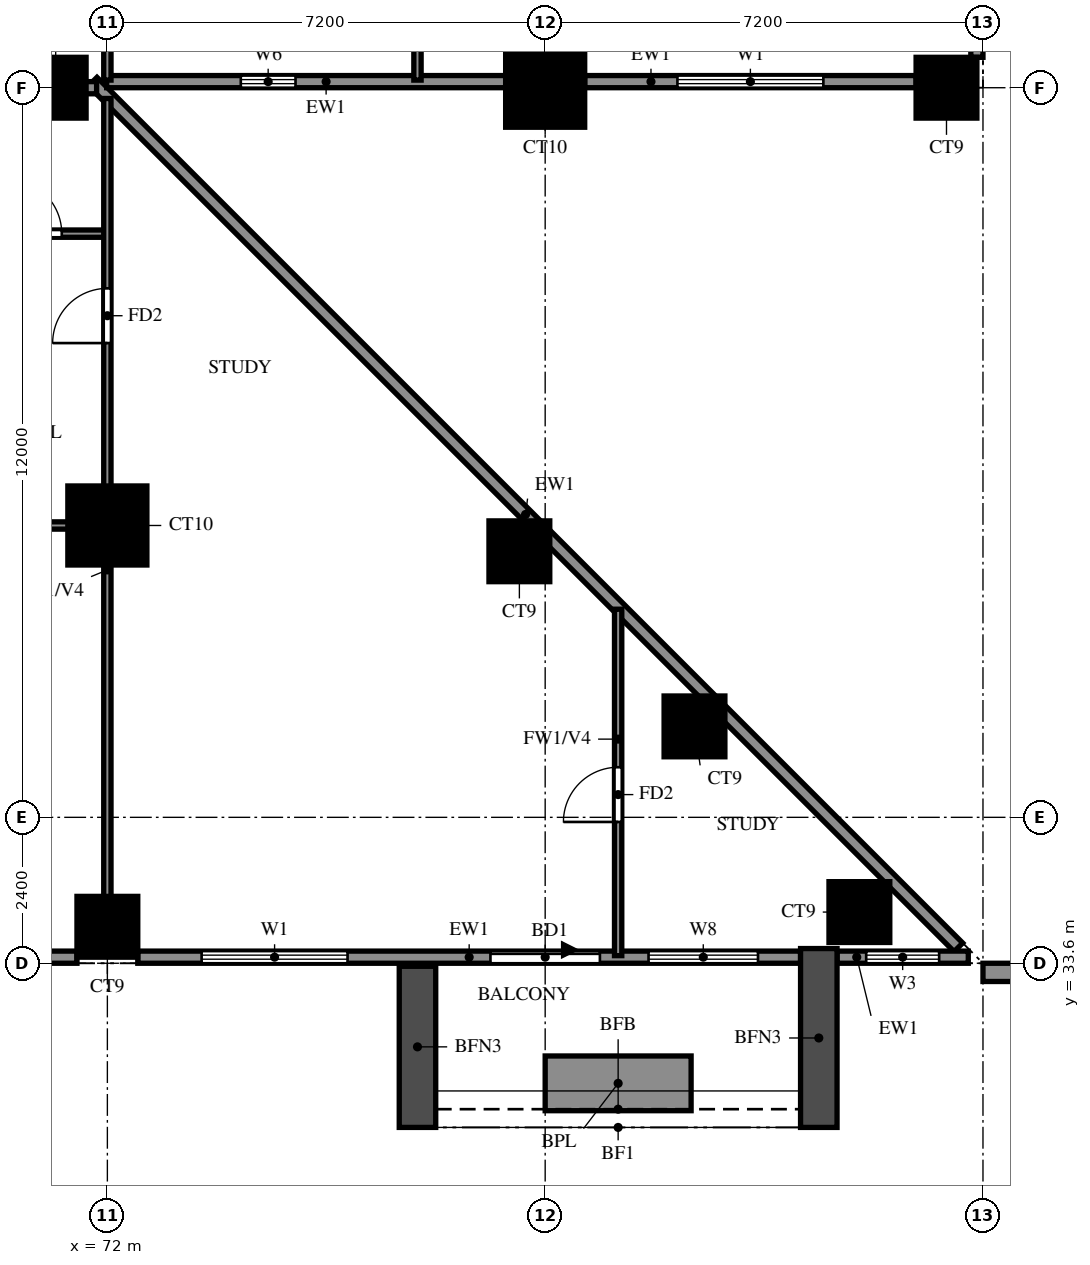
"""IFC4 building model, lengths in metres.
Left out: names, types, materials, properties, quantities, classifications, styles, units other than length and angle.
Written with IfcOpenShell. Run it as: python <this file> out.ifc"""

import sys

from ifc_helpers import new_model, si_unit, direction, frame, frame_2d, origin, origin_2d, place, context, subcontext, project, spatial, rectangle, extrude, source, transform, mapped, element, fill, save


model = new_model("IFC4")
c1 = context("Model", 3, precision=1e-05, world=origin(), true_north=direction((0.0, 1.0)))
c2 = subcontext(c1, "Body", "Model", "MODEL_VIEW")
j1 = project(units=[si_unit("LENGTHUNIT", "METRE"), si_unit("PLANEANGLEUNIT", "RADIAN")], contexts=[c1])
p1 = place(None, origin())
s1 = spatial("IfcSite", under=j1, at=p1, CompositionType="ELEMENT")
p2 = place(p1, origin())
s2 = spatial("IfcBuilding", under=s1, at=p2, CompositionType="ELEMENT")
p3 = place(p2, frame((0.0, 0.0, 76.0)))
s3 = spatial("IfcBuildingStorey", under=s2, at=p3, CompositionType="ELEMENT", Elevation=76.0)
m1 = source(origin(), c2, "Body", "SweptSolid", [
    extrude(rectangle(XDim=1.0, YDim=1.0, at=origin_2d()), origin(), (0.0, 0.0, 1.0), 3.18),
])
for number, where, z_axis, x_axis in (
    (1, (72.0, 34.2, 0.0), (0.0, 0.0, 1.0), (1.0, 0.0, 0.0)),
    (2, (84.367, 34.442, 0.0), (0.0, 0.0, 1.0), (1.0, 0.0, 0.0)),
    (3, (81.656, 37.496, 0.0), (0.0, 0.0, 1.0), (1.0, 0.0, 0.0)),
    (4, (78.776, 40.376, 0.0), (0.0, 0.0, 1.0), (1.0, 0.0, 0.0)),
):
    element("IfcColumn", number, at=place(p3, frame(where, z_axis=z_axis, x_axis=x_axis)), inside=s3, PredefinedType="COLUMN", context=c2, shape_type="MappedRepresentation", body=[
        mapped(m1, transform((0.0, 0.0, 0.0))),
    ])
m2 = source(origin(), c2, "Body", "SweptSolid", [
    extrude(rectangle(XDim=1.3, YDim=1.3, at=origin_2d()), origin(), (0.0, 0.0, 1.0), 3.18),
])
p4 = place(p3, frame((72.0, 40.8, 0.0), z_axis=(0.0, 0.0, 1.0), x_axis=(1.0, 0.0, 0.0)))
e5 = element("IfcColumn", 5, at=p4, inside=s3, PredefinedType="COLUMN", context=c2, shape_type="MappedRepresentation", body=[
    mapped(m2, transform((0.0, 0.0, 0.0))),
])
p5 = place(p3, frame((71.15, 48.0, 0.0), z_axis=(0.0, 0.0, 1.0), x_axis=(1.0, 0.0, 0.0)))
e6 = element("IfcColumn", 6, at=p5, inside=s3, PredefinedType="COLUMN", context=c2, shape_type="MappedRepresentation", body=[
    mapped(m1, transform((0.0, 0.0, 0.0))),
])
p6 = place(p3, frame((79.2, 48.0, 0.0), z_axis=(0.0, 0.0, 1.0), x_axis=(1.0, 0.0, 0.0)))
e7 = element("IfcColumn", 7, at=p6, inside=s3, PredefinedType="COLUMN", context=c2, shape_type="MappedRepresentation", body=[
    mapped(m2, transform((0.0, 0.0, 0.0))),
])
p7 = place(p3, frame((85.8, 48.0, 0.0), z_axis=(0.0, 0.0, 1.0), x_axis=(1.0, 0.0, 0.0)))
e8 = element("IfcColumn", 8, at=p7, inside=s3, PredefinedType="COLUMN", context=c2, shape_type="MappedRepresentation", body=[
    mapped(m1, transform((0.0, 0.0, 0.0))),
])
p8 = place(p3, frame((85.996, 33.863, 0.0), z_axis=(0.0, 0.0, 1.0), x_axis=(-0.707100718496, 0.707112843825, 0.0)))
e9 = element("IfcWall", 9, at=p8, inside=s3, PredefinedType="SOLIDWALL", context=c2, shape_type="SweptSolid", body=[
    extrude(rectangle(XDim=20.135, YDim=0.2, at=frame_2d((10.067, 0.0))), origin(), (0.0, 0.0, 1.0), 3.18),
])
p9 = place(p3, frame((71.989, 48.1, 0.0), z_axis=(0.0, 0.0, 1.0), x_axis=(1.0, 0.0, 0.0)))
e10 = element("IfcWall", 10, at=p9, inside=s3, PredefinedType="SOLIDWALL", context=c2, shape_type="SweptSolid", body=[
    extrude(rectangle(XDim=6.562, YDim=0.2, at=frame_2d((3.281, 0.0))), origin(), (0.0, 0.0, 1.0), 3.18),
])
p10 = place(p9, frame((2.206, 0.0, 1.5)))
e11 = element("IfcOpeningElement", 11, at=p10, cuts=e10, PredefinedType="OPENING", context=c2, shape_type="SweptSolid", body=[
    extrude(rectangle(XDim=0.9, YDim=0.9, at=frame_2d((0.45, 0.45))), frame((0.0, 0.11, 0.0), z_axis=(0.0, -1.0, 0.0), x_axis=(1.0, 0.0, 0.0)), (0.0, 0.0, 1.0), 0.22),
])
p11 = place(p3, frame((79.85, 48.1, 0.0), z_axis=(0.0, 0.0, 1.0), x_axis=(1.0, 0.0, 0.0)))
e12 = element("IfcWall", 12, at=p11, inside=s3, PredefinedType="SOLIDWALL", context=c2, shape_type="SweptSolid", body=[
    extrude(rectangle(XDim=5.45, YDim=0.2, at=frame_2d((2.725, 0.0))), origin(), (0.0, 0.0, 1.0), 3.18),
])
p12 = place(p11, frame((1.525, 0.0, 0.6)))
e13 = element("IfcOpeningElement", 13, at=p12, cuts=e12, PredefinedType="OPENING", context=c2, shape_type="SweptSolid", body=[
    extrude(rectangle(XDim=2.4, YDim=2.4, at=frame_2d((1.2, 1.2))), frame((0.0, 0.11, 0.0), z_axis=(0.0, -1.0, 0.0), x_axis=(1.0, 0.0, 0.0)), (0.0, 0.0, 1.0), 0.22),
])
p13 = place(p3, frame((86.3, 48.5, 0.0), z_axis=(0.0, 0.0, 1.0), x_axis=(0.0, 1.0, 0.0)))
e14 = element("IfcWall", 14, at=p13, inside=s3, PredefinedType="SOLIDWALL", context=c2, shape_type="SweptSolid", body=[
    extrude(rectangle(XDim=6.2, YDim=0.2, at=frame_2d((3.1, 0.0))), origin(), (0.0, 0.0, 1.0), 3.18),
])
p14 = place(p13, frame((1.9, 0.0, 0.6)))
e15 = element("IfcOpeningElement", 15, at=p14, cuts=e14, PredefinedType="OPENING", context=c2, shape_type="SweptSolid", body=[
    extrude(rectangle(XDim=2.4, YDim=2.4, at=frame_2d((1.2, 1.2))), frame((0.0, 0.11, 0.0), z_axis=(0.0, -1.0, 0.0), x_axis=(1.0, 0.0, 0.0)), (0.0, 0.0, 1.0), 0.22),
])
p15 = place(p3, frame((65.3, 33.7, 0.0), z_axis=(0.0, 0.0, 1.0), x_axis=(1.0, 0.0, 0.0)))
e16 = element("IfcWall", 16, at=p15, inside=s3, PredefinedType="SOLIDWALL", context=c2, shape_type="SweptSolid", body=[
    extrude(rectangle(XDim=6.2, YDim=0.2, at=frame_2d((3.1, 0.0))), origin(), (0.0, 0.0, 1.0), 3.18),
])
p16 = place(p15, frame((3.65, 0.0, 0.6)))
e17 = element("IfcOpeningElement", 17, at=p16, cuts=e16, PredefinedType="OPENING", context=c2, shape_type="SweptSolid", body=[
    extrude(rectangle(XDim=1.8, YDim=2.4, at=frame_2d((0.9, 1.2))), frame((0.0, 0.11, 0.0), z_axis=(0.0, -1.0, 0.0), x_axis=(1.0, 0.0, 0.0)), (0.0, 0.0, 1.0), 0.22),
])
p17 = place(p15, frame((1.2, 0.0, 1.5)))
e18 = element("IfcOpeningElement", 18, at=p17, cuts=e16, PredefinedType="OPENING", context=c2, shape_type="SweptSolid", body=[
    extrude(rectangle(XDim=0.9, YDim=0.9, at=frame_2d((0.45, 0.45))), frame((0.0, 0.11, 0.0), z_axis=(0.0, -1.0, 0.0), x_axis=(1.0, 0.0, 0.0)), (0.0, 0.0, 1.0), 0.22),
])
p18 = place(p3, frame((72.5, 33.7, 0.0), z_axis=(0.0, 0.0, 1.0), x_axis=(1.0, 0.0, 0.0)))
e19 = element("IfcWall", 19, at=p18, inside=s3, PredefinedType="SOLIDWALL", context=c2, shape_type="SweptSolid", body=[
    extrude(rectangle(XDim=10.9, YDim=0.2, at=frame_2d((5.45, 0.0))), origin(), (0.0, 0.0, 1.0), 3.18),
])
p19 = place(p18, frame((5.8, 0.0, 0.0)))
e20 = element("IfcOpeningElement", 20, at=p19, cuts=e19, PredefinedType="OPENING", context=c2, shape_type="SweptSolid", body=[
    extrude(rectangle(XDim=1.8, YDim=2.4, at=frame_2d((0.9, 1.2))), frame((0.0, 0.11, 0.0), z_axis=(0.0, -1.0, 0.0), x_axis=(1.0, 0.0, 0.0)), (0.0, 0.0, 1.0), 0.22),
])
p20 = place(p18, frame((1.05, 0.0, 0.6)))
e21 = element("IfcOpeningElement", 21, at=p20, cuts=e19, PredefinedType="OPENING", context=c2, shape_type="SweptSolid", body=[
    extrude(rectangle(XDim=2.4, YDim=2.4, at=frame_2d((1.2, 1.2))), frame((0.0, 0.11, 0.0), z_axis=(0.0, -1.0, 0.0), x_axis=(1.0, 0.0, 0.0)), (0.0, 0.0, 1.0), 0.22),
])
p21 = place(p18, frame((8.4, 0.0, 0.6)))
e22 = element("IfcOpeningElement", 22, at=p21, cuts=e19, PredefinedType="OPENING", context=c2, shape_type="SweptSolid", body=[
    extrude(rectangle(XDim=1.8, YDim=2.4, at=frame_2d((0.9, 1.2))), frame((0.0, 0.11, 0.0), z_axis=(0.0, -1.0, 0.0), x_axis=(1.0, 0.0, 0.0)), (0.0, 0.0, 1.0), 0.22),
])
p22 = place(p3, frame((84.0, 33.7, 0.0), z_axis=(0.0, 0.0, 1.0), x_axis=(1.0, 0.0, 0.0)))
e23 = element("IfcWall", 23, at=p22, inside=s3, PredefinedType="SOLIDWALL", context=c2, shape_type="SweptSolid", body=[
    extrude(rectangle(XDim=2.159, YDim=0.2, at=frame_2d((1.079, 0.0))), origin(), (0.0, 0.0, 1.0), 3.18),
])
p23 = place(p22, frame((0.479, 0.0, 0.6)))
e24 = element("IfcOpeningElement", 24, at=p23, cuts=e23, PredefinedType="OPENING", context=c2, shape_type="SweptSolid", body=[
    extrude(rectangle(XDim=1.2, YDim=2.4, at=frame_2d((0.6, 1.2))), frame((0.0, 0.11, 0.0), z_axis=(0.0, -1.0, 0.0), x_axis=(1.0, 0.0, 0.0)), (0.0, 0.0, 1.0), 0.22),
])
p24 = place(p3, frame((86.4, 33.45, -0.32), z_axis=(0.0, 0.0, 1.0), x_axis=(1.0, 0.0, 0.0)))
e25 = element("IfcWall", 25, at=p24, inside=s3, PredefinedType="SOLIDWALL", context=c2, shape_type="SweptSolid", body=[
    extrude(rectangle(XDim=2.4, YDim=0.3, at=frame_2d((1.2, 0.0))), origin(), (0.0, 0.0, 1.0), 3.5),
])
p25 = place(p3, frame((77.1, 33.55, 0.0), z_axis=(0.0, 0.0, 1.0), x_axis=(0.0, -1.0, 0.0)))
e26 = element("IfcWall", 26, at=p25, inside=s3, PredefinedType="SOLIDWALL", context=c2, shape_type="SweptSolid", body=[
    extrude(rectangle(XDim=2.65, YDim=0.6, at=frame_2d((1.325, 0.0))), origin(), (0.0, 0.0, 1.0), 2.85),
])
p26 = place(p3, frame((83.7, 33.842, 0.0), z_axis=(0.0, 0.0, 1.0), x_axis=(0.0, -1.0, 0.0)))
e27 = element("IfcWall", 27, at=p26, inside=s3, PredefinedType="SOLIDWALL", context=c2, shape_type="SweptSolid", body=[
    extrude(rectangle(XDim=2.942, YDim=0.6, at=frame_2d((1.471, 0.0))), origin(), (0.0, 0.0, 1.0), 2.85),
])
p27 = place(p3, frame((79.2, 31.625, 0.0), z_axis=(0.0, 0.0, 1.0), x_axis=(1.0, 0.0, 0.0)))
e28 = element("IfcWall", 28, at=p27, inside=s3, PredefinedType="SOLIDWALL", context=c2, shape_type="SweptSolid", body=[
    extrude(rectangle(XDim=2.4, YDim=0.9, at=frame_2d((1.2, 0.0))), origin(), (0.0, 0.0, 1.0), 0.9),
])
p28 = place(p3, frame((67.2, 48.0, 0.0), z_axis=(0.0, 0.0, 1.0), x_axis=(1.0, 0.0, 0.0)))
e29 = element("IfcWall", 29, at=p28, inside=s3, PredefinedType="SOLIDWALL", context=c2, shape_type="SweptSolid", body=[
    extrude(rectangle(XDim=4.623, YDim=0.2, at=frame_2d((2.312, 0.0))), origin(), (0.0, 0.0, 1.0), 3.18),
])
p29 = place(p3, frame((68.4, 40.8, 0.0), z_axis=(0.0, 0.0, 1.0), x_axis=(1.0, 0.0, 0.0)))
e30 = element("IfcWall", 30, at=p29, inside=s3, PredefinedType="PARTITIONING", context=c2, shape_type="SweptSolid", body=[
    extrude(rectangle(XDim=3.6, YDim=0.12, at=frame_2d((1.8, 0.0))), origin(), (0.0, 0.0, 1.0), 3.18),
])
p30 = place(p29, frame((1.35, 0.0, 0.0)))
e31 = element("IfcOpeningElement", 31, at=p30, cuts=e30, PredefinedType="OPENING", context=c2, shape_type="SweptSolid", body=[
    extrude(rectangle(XDim=0.9, YDim=2.1, at=frame_2d((0.45, 1.05))), frame((0.0, 0.07, 0.0), z_axis=(0.0, -1.0, 0.0), x_axis=(1.0, 0.0, 0.0)), (0.0, 0.0, 1.0), 0.14),
])
p31 = place(p3, frame((67.2, 45.6, 0.0), z_axis=(0.0, 0.0, 1.0), x_axis=(1.0, 0.0, 0.0)))
e32 = element("IfcWall", 32, at=p31, inside=s3, PredefinedType="PARTITIONING", context=c2, shape_type="SweptSolid", body=[
    extrude(rectangle(XDim=4.8, YDim=0.12, at=frame_2d((2.4, 0.0))), origin(), (0.0, 0.0, 1.0), 3.18),
])
p32 = place(p31, frame((3.15, 0.0, 0.0)))
e33 = element("IfcOpeningElement", 33, at=p32, cuts=e32, PredefinedType="OPENING", context=c2, shape_type="SweptSolid", body=[
    extrude(rectangle(XDim=0.9, YDim=2.1, at=frame_2d((0.45, 1.05))), frame((0.0, 0.07, 0.0), z_axis=(0.0, -1.0, 0.0), x_axis=(1.0, 0.0, 0.0)), (0.0, 0.0, 1.0), 0.14),
])
p33 = place(p3, frame((72.0, 33.725, 0.0), z_axis=(0.0, 0.0, 1.0), x_axis=(0.0, 1.0, 0.0)))
e34 = element("IfcWall", 34, at=p33, inside=s3, PredefinedType="PARTITIONING", context=c2, shape_type="SweptSolid", body=[
    extrude(rectangle(XDim=14.098, YDim=0.12, at=frame_2d((7.049, 0.0))), origin(), (0.0, 0.0, 1.0), 2.28),
])
p34 = place(p33, frame((10.075, 0.0, 0.0)))
e35 = element("IfcOpeningElement", 35, at=p34, cuts=e34, PredefinedType="OPENING", context=c2, shape_type="SweptSolid", body=[
    extrude(rectangle(XDim=0.9, YDim=2.1, at=frame_2d((0.45, 1.05))), frame((0.0, 0.07, 0.0), z_axis=(0.0, -1.0, 0.0), x_axis=(1.0, 0.0, 0.0)), (0.0, 0.0, 1.0), 0.14),
])
for number, where, z_axis, x_axis in (
    (36, (72.0, 48.125, 0.0), (0.0, 0.0, 1.0), (0.0, 1.0, 0.0)),
    (37, (77.1, 48.125, 0.0), (0.0, 0.0, 1.0), (0.0, 1.0, 0.0)),
):
    element("IfcWall", number, at=place(p3, frame(where, z_axis=z_axis, x_axis=x_axis)), inside=s3, PredefinedType="PARTITIONING", context=c2, shape_type="SweptSolid", body=[
        extrude(rectangle(XDim=3.475, YDim=0.12, at=frame_2d((1.738, 0.0))), origin(), (0.0, 0.0, 1.0), 3.18),
    ])
p35 = place(p3, frame((79.2, 48.125, 0.0), z_axis=(0.0, 0.0, 1.0), x_axis=(0.0, 1.0, 0.0)))
e38 = element("IfcWall", 38, at=p35, inside=s3, PredefinedType="PARTITIONING", context=c2, shape_type="SweptSolid", body=[
    extrude(rectangle(XDim=25.075, YDim=0.12, at=frame_2d((12.538, 0.0))), origin(), (0.0, 0.0, 1.0), 3.18),
])
p36 = place(p35, frame((2.788, 0.0, 0.0)))
e39 = element("IfcOpeningElement", 39, at=p36, cuts=e38, PredefinedType="OPENING", context=c2, shape_type="SweptSolid", body=[
    extrude(rectangle(XDim=1.5, YDim=2.1, at=frame_2d((0.75, 1.05))), frame((0.0, 0.07, 0.0), z_axis=(0.0, -1.0, 0.0), x_axis=(1.0, 0.0, 0.0)), (0.0, 0.0, 1.0), 0.14),
])
p37 = place(p35, frame((8.425, 0.0, 0.0)))
e40 = element("IfcOpeningElement", 40, at=p37, cuts=e38, PredefinedType="OPENING", context=c2, shape_type="SweptSolid", body=[
    extrude(rectangle(XDim=0.9, YDim=2.1, at=frame_2d((0.45, 1.05))), frame((0.0, 0.07, 0.0), z_axis=(0.0, -1.0, 0.0), x_axis=(1.0, 0.0, 0.0)), (0.0, 0.0, 1.0), 0.14),
])
p38 = place(p35, frame((12.025, 0.0, 0.0)))
e41 = element("IfcOpeningElement", 41, at=p38, cuts=e38, PredefinedType="OPENING", context=c2, shape_type="SweptSolid", body=[
    extrude(rectangle(XDim=0.9, YDim=2.1, at=frame_2d((0.45, 1.05))), frame((0.0, 0.07, 0.0), z_axis=(0.0, -1.0, 0.0), x_axis=(1.0, 0.0, 0.0)), (0.0, 0.0, 1.0), 0.14),
])
p39 = place(p35, frame((15.625, 0.0, 0.0)))
e42 = element("IfcOpeningElement", 42, at=p39, cuts=e38, PredefinedType="OPENING", context=c2, shape_type="SweptSolid", body=[
    extrude(rectangle(XDim=0.9, YDim=2.1, at=frame_2d((0.45, 1.05))), frame((0.0, 0.07, 0.0), z_axis=(0.0, -1.0, 0.0), x_axis=(1.0, 0.0, 0.0)), (0.0, 0.0, 1.0), 0.14),
])
p40 = place(p35, frame((19.225, 0.0, 0.0)))
e43 = element("IfcOpeningElement", 43, at=p40, cuts=e38, PredefinedType="OPENING", context=c2, shape_type="SweptSolid", body=[
    extrude(rectangle(XDim=0.9, YDim=2.1, at=frame_2d((0.45, 1.05))), frame((0.0, 0.07, 0.0), z_axis=(0.0, -1.0, 0.0), x_axis=(1.0, 0.0, 0.0)), (0.0, 0.0, 1.0), 0.14),
])
p41 = place(p35, frame((22.825, 0.0, 0.0)))
e44 = element("IfcOpeningElement", 44, at=p41, cuts=e38, PredefinedType="OPENING", context=c2, shape_type="SweptSolid", body=[
    extrude(rectangle(XDim=0.9, YDim=2.1, at=frame_2d((0.45, 1.05))), frame((0.0, 0.07, 0.0), z_axis=(0.0, -1.0, 0.0), x_axis=(1.0, 0.0, 0.0)), (0.0, 0.0, 1.0), 0.14),
])
p42 = place(p3, frame((80.4, 33.725, 0.0), z_axis=(0.0, 0.0, 1.0), x_axis=(0.0, 1.0, 0.0)))
e45 = element("IfcWall", 45, at=p42, inside=s3, PredefinedType="PARTITIONING", context=c2, shape_type="SweptSolid", body=[
    extrude(rectangle(XDim=5.698, YDim=0.12, at=frame_2d((2.849, 0.0))), origin(), (0.0, 0.0, 1.0), 2.28),
])
p43 = place(p42, frame((2.199, 0.0, 0.0)))
e46 = element("IfcOpeningElement", 46, at=p43, cuts=e45, PredefinedType="OPENING", context=c2, shape_type="SweptSolid", body=[
    extrude(rectangle(XDim=0.9, YDim=2.1, at=frame_2d((0.45, 1.05))), frame((0.0, 0.07, 0.0), z_axis=(0.0, -1.0, 0.0), x_axis=(1.0, 0.0, 0.0)), (0.0, 0.0, 1.0), 0.14),
])
p44 = place(p10, origin())
e47 = element("IfcWindow", 47, at=p44, inside=s3, PartitioningType="SINGLE_PANEL", PredefinedType="WINDOW", context=c2, shape_type="SweptSolid", body=[
    extrude(rectangle(XDim=0.9, YDim=0.9, at=frame_2d((0.45, 0.45))), frame((0.0, 0.03, 0.0), z_axis=(0.0, -1.0, 0.0), x_axis=(1.0, 0.0, 0.0)), (0.0, 0.0, 1.0), 0.06),
])
fill(e11, e47)
p45 = place(p12, origin())
e48 = element("IfcWindow", 48, at=p45, inside=s3, PartitioningType="DOUBLE_PANEL_VERTICAL", PredefinedType="WINDOW", context=c2, shape_type="SweptSolid", body=[
    extrude(rectangle(XDim=2.4, YDim=2.4, at=frame_2d((1.2, 1.2))), frame((0.0, 0.03, 0.0), z_axis=(0.0, -1.0, 0.0), x_axis=(1.0, 0.0, 0.0)), (0.0, 0.0, 1.0), 0.06),
])
fill(e13, e48)
p46 = place(p19, origin())
e49 = element("IfcDoor", 49, at=p46, inside=s3, OperationType="DOUBLE_DOOR_SLIDING", PredefinedType="DOOR", context=c2, shape_type="SweptSolid", body=[
    extrude(rectangle(XDim=1.8, YDim=2.4, at=frame_2d((0.9, 1.2))), frame((0.0, 0.025, 0.0), z_axis=(0.0, -1.0, 0.0), x_axis=(1.0, 0.0, 0.0)), (0.0, 0.0, 1.0), 0.05),
])
fill(e20, e49)
p47 = place(p20, origin())
e50 = element("IfcWindow", 50, at=p47, inside=s3, PartitioningType="DOUBLE_PANEL_VERTICAL", PredefinedType="WINDOW", context=c2, shape_type="SweptSolid", body=[
    extrude(rectangle(XDim=2.4, YDim=2.4, at=frame_2d((1.2, 1.2))), frame((0.0, 0.03, 0.0), z_axis=(0.0, -1.0, 0.0), x_axis=(1.0, 0.0, 0.0)), (0.0, 0.0, 1.0), 0.06),
])
fill(e21, e50)
p48 = place(p21, origin())
e51 = element("IfcWindow", 51, at=p48, inside=s3, PartitioningType="DOUBLE_PANEL_VERTICAL", PredefinedType="WINDOW", context=c2, shape_type="SweptSolid", body=[
    extrude(rectangle(XDim=1.8, YDim=2.4, at=frame_2d((0.9, 1.2))), frame((0.0, 0.03, 0.0), z_axis=(0.0, -1.0, 0.0), x_axis=(1.0, 0.0, 0.0)), (0.0, 0.0, 1.0), 0.06),
])
fill(e22, e51)
p49 = place(p23, origin())
e52 = element("IfcWindow", 52, at=p49, inside=s3, PartitioningType="SINGLE_PANEL", PredefinedType="WINDOW", context=c2, shape_type="SweptSolid", body=[
    extrude(rectangle(XDim=1.2, YDim=2.4, at=frame_2d((0.6, 1.2))), frame((0.0, 0.03, 0.0), z_axis=(0.0, -1.0, 0.0), x_axis=(1.0, 0.0, 0.0)), (0.0, 0.0, 1.0), 0.06),
])
fill(e24, e52)
p50 = place(p32, origin())
e53 = element("IfcDoor", 53, at=p50, inside=s3, OperationType="SINGLE_SWING_LEFT", PredefinedType="DOOR", context=c2, shape_type="SweptSolid", body=[
    extrude(rectangle(XDim=0.9, YDim=2.1, at=frame_2d((0.45, 1.05))), frame((0.0, 0.025, 0.0), z_axis=(0.0, -1.0, 0.0), x_axis=(1.0, 0.0, 0.0)), (0.0, 0.0, 1.0), 0.05),
])
fill(e33, e53)
p51 = place(p34, origin())
e54 = element("IfcDoor", 54, at=p51, inside=s3, OperationType="SINGLE_SWING_LEFT", PredefinedType="DOOR", context=c2, shape_type="SweptSolid", body=[
    extrude(rectangle(XDim=0.9, YDim=2.1, at=frame_2d((0.45, 1.05))), frame((0.0, 0.025, 0.0), z_axis=(0.0, -1.0, 0.0), x_axis=(1.0, 0.0, 0.0)), (0.0, 0.0, 1.0), 0.05),
])
fill(e35, e54)
p52 = place(p43, origin())
e55 = element("IfcDoor", 55, at=p52, inside=s3, OperationType="SINGLE_SWING_LEFT", PredefinedType="DOOR", context=c2, shape_type="SweptSolid", body=[
    extrude(rectangle(XDim=0.9, YDim=2.1, at=frame_2d((0.45, 1.05))), frame((0.0, 0.025, 0.0), z_axis=(0.0, -1.0, 0.0), x_axis=(1.0, 0.0, 0.0)), (0.0, 0.0, 1.0), 0.05),
])
fill(e46, e55)
save(model, sys.argv[1])
